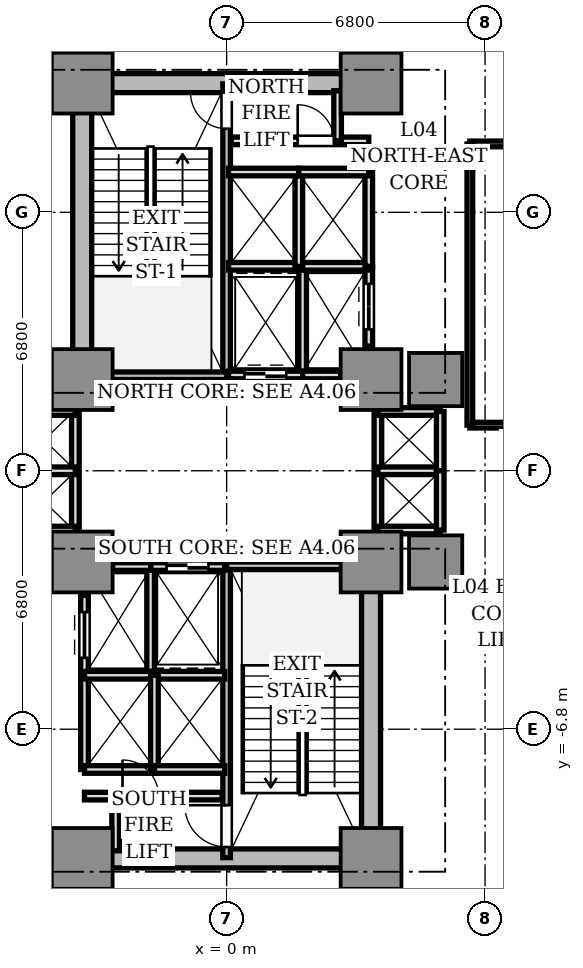
"""IFC4 building model, lengths in metres.
Left out: names, types, materials, properties, quantities, classifications, styles, units other than length and angle.
Written with IfcOpenShell. Run it as: python <this file> out.ifc"""

import sys

from ifc_helpers import new_model, si_unit, direction, frame, frame_2d, origin, origin_2d, place, context, subcontext, project, spatial, rectangle, extrude, source, transform, mapped, element, fill, save


model = new_model("IFC4")
c1 = context("Model", 3, precision=1e-05, world=origin(), true_north=direction((0.0, 1.0)))
c2 = subcontext(c1, "Body", "Model", "MODEL_VIEW")
j1 = project(units=[si_unit("LENGTHUNIT", "METRE"), si_unit("PLANEANGLEUNIT", "RADIAN")], contexts=[c1])
p1 = place(None, origin())
s1 = spatial("IfcSite", under=j1, at=p1, CompositionType="ELEMENT")
p2 = place(p1, origin())
s2 = spatial("IfcBuilding", under=s1, at=p2, CompositionType="ELEMENT")
p3 = place(p2, frame((0.0, 0.0, 18.6)))
s3 = spatial("IfcBuildingStorey", under=s2, at=p3, CompositionType="ELEMENT", Elevation=18.6)
p4 = place(p3, frame((-3.55, 10.2, 0.0), z_axis=(0.0, 0.0, 1.0), x_axis=(1.0, 0.0, 0.0)))
e1 = element("IfcWall", 1, at=p4, inside=s3, PredefinedType="SHEAR", context=c2, shape_type="SweptSolid", body=[
    extrude(rectangle(XDim=7.1, YDim=0.5, at=frame_2d((3.55, 0.0))), origin(), (0.0, 0.0, 1.0), 4.26),
])
p5 = place(p3, frame((-3.8, 2.85, 0.0), z_axis=(0.0, 0.0, 1.0), x_axis=(0.0, 1.0, 0.0)))
e2 = element("IfcWall", 2, at=p5, inside=s3, PredefinedType="SHEAR", context=c2, shape_type="SweptSolid", body=[
    extrude(rectangle(XDim=6.9, YDim=0.5, at=frame_2d((3.45, 0.0))), origin(), (0.0, 0.0, 1.0), 4.26),
])
p6 = place(p3, frame((-3.55, -10.2, 0.0), z_axis=(0.0, 0.0, 1.0), x_axis=(1.0, 0.0, 0.0)))
e3 = element("IfcWall", 3, at=p6, inside=s3, PredefinedType="SHEAR", context=c2, shape_type="SweptSolid", body=[
    extrude(rectangle(XDim=7.1, YDim=0.5, at=frame_2d((3.55, 0.0))), origin(), (0.0, 0.0, 1.0), 4.26),
])
p7 = place(p3, frame((3.8, -9.75, 0.0), z_axis=(0.0, 0.0, 1.0), x_axis=(0.0, 1.0, 0.0)))
e4 = element("IfcWall", 4, at=p7, inside=s3, PredefinedType="SHEAR", context=c2, shape_type="SweptSolid", body=[
    extrude(rectangle(XDim=6.9, YDim=0.5, at=frame_2d((3.45, 0.0))), origin(), (0.0, 0.0, 1.0), 4.26),
])
m1 = source(origin(), c2, "Body", "SweptSolid", [
    extrude(rectangle(XDim=1.6, YDim=1.6, at=origin_2d()), origin(), (0.0, 0.0, 1.0), 4.26),
])
for number, where, z_axis, x_axis in (
    (5, (-3.8, 2.4, 0.0), (0.0, 0.0, 1.0), (1.0, 0.0, 0.0)),
    (6, (3.8, 2.4, 0.0), (0.0, 0.0, 1.0), (1.0, 0.0, 0.0)),
    (7, (-3.8, 10.2, 0.0), (0.0, 0.0, 1.0), (1.0, 0.0, 0.0)),
    (8, (3.8, 10.2, 0.0), (0.0, 0.0, 1.0), (1.0, 0.0, 0.0)),
    (9, (-3.8, -2.4, 0.0), (0.0, 0.0, 1.0), (1.0, 0.0, 0.0)),
    (10, (3.8, -2.4, 0.0), (0.0, 0.0, 1.0), (1.0, 0.0, 0.0)),
    (11, (-3.8, -10.2, 0.0), (0.0, 0.0, 1.0), (1.0, 0.0, 0.0)),
    (12, (3.8, -10.2, 0.0), (0.0, 0.0, 1.0), (1.0, 0.0, 0.0)),
):
    element("IfcColumn", number, at=place(p3, frame(where, z_axis=z_axis, x_axis=x_axis)), inside=s3, PredefinedType="COLUMN", context=c2, shape_type="MappedRepresentation", body=[
        mapped(m1, transform((0.0, 0.0, 0.0), scale=1.0)),
    ])
m2 = source(origin(), c2, "Body", "SweptSolid", [
    extrude(rectangle(XDim=1.4, YDim=1.4, at=origin_2d()), origin(), (0.0, 0.0, 1.0), 4.26),
])
for number, where, z_axis, x_axis in (
    (13, (5.5, 2.4, 0.0), (0.0, 0.0, 1.0), (1.0, 0.0, 0.0)),
    (14, (5.5, -2.4, 0.0), (0.0, 0.0, 1.0), (1.0, 0.0, 0.0)),
):
    element("IfcColumn", number, at=place(p3, frame(where, z_axis=z_axis, x_axis=x_axis)), inside=s3, PredefinedType="COLUMN", context=c2, shape_type="MappedRepresentation", body=[
        mapped(m2, transform((0.0, 0.0, 0.0), scale=1.0)),
    ])
p8 = place(p3, frame((0.0, 2.5, 0.0), z_axis=(0.0, 0.0, 1.0), x_axis=(0.0, 1.0, 0.0)))
e15 = element("IfcWall", 15, at=p8, inside=s3, PredefinedType="SOLIDWALL", context=c2, shape_type="SweptSolid", body=[
    extrude(rectangle(XDim=7.68, YDim=0.2, at=frame_2d((3.84, 0.0))), origin(), (0.0, 0.0, 1.0), 4.26),
])
p9 = place(p8, frame((6.5, 0.0, 0.0)))
e16 = element("IfcOpeningElement", 16, at=p9, cuts=e15, PredefinedType="OPENING", context=c2, shape_type="SweptSolid", body=[
    extrude(rectangle(XDim=0.95, YDim=2.15, at=frame_2d((0.475, 1.075))), frame((0.0, 0.11, 0.0), z_axis=(0.0, -1.0, 0.0), x_axis=(1.0, 0.0, 0.0)), (0.0, 0.0, 1.0), 0.22),
])
p10 = place(p3, frame((-3.72, 2.5, 0.0), z_axis=(0.0, 0.0, 1.0), x_axis=(1.0, 0.0, 0.0)))
e17 = element("IfcWall", 17, at=p10, inside=s3, PredefinedType="SOLIDWALL", context=c2, shape_type="SweptSolid", body=[
    extrude(rectangle(XDim=3.72, YDim=0.2, at=frame_2d((1.86, 0.0))), origin(), (0.0, 0.0, 1.0), 4.26),
])
p11 = place(p3, frame((0.0, -10.18, 0.0), z_axis=(0.0, 0.0, 1.0), x_axis=(0.0, 1.0, 0.0)))
e18 = element("IfcWall", 18, at=p11, inside=s3, PredefinedType="SOLIDWALL", context=c2, shape_type="SweptSolid", body=[
    extrude(rectangle(XDim=7.68, YDim=0.2, at=frame_2d((3.84, 0.0))), origin(), (0.0, 0.0, 1.0), 4.26),
])
p12 = place(p11, frame((0.28, 0.0, 0.0)))
e19 = element("IfcOpeningElement", 19, at=p12, cuts=e18, PredefinedType="OPENING", context=c2, shape_type="SweptSolid", body=[
    extrude(rectangle(XDim=1.1, YDim=2.15, at=frame_2d((0.55, 1.075))), frame((0.0, 0.11, 0.0), z_axis=(0.0, -1.0, 0.0), x_axis=(1.0, 0.0, 0.0)), (0.0, 0.0, 1.0), 0.22),
])
p13 = place(p3, frame((0.0, -2.5, 0.0), z_axis=(0.0, 0.0, 1.0), x_axis=(1.0, 0.0, 0.0)))
e20 = element("IfcWall", 20, at=p13, inside=s3, PredefinedType="SOLIDWALL", context=c2, shape_type="SweptSolid", body=[
    extrude(rectangle(XDim=3.72, YDim=0.2, at=frame_2d((1.86, 0.0))), origin(), (0.0, 0.0, 1.0), 4.26),
])
p14 = place(p3, frame((2.0, 2.5, 0.0), z_axis=(0.0, 0.0, 1.0), x_axis=(0.0, 1.0, 0.0)))
e21 = element("IfcWall", 21, at=p14, inside=s3, PredefinedType="SOLIDWALL", context=c2, shape_type="SweptSolid", body=[
    extrude(rectangle(XDim=2.78, YDim=0.2, at=frame_2d((1.39, 0.0))), origin(), (0.0, 0.0, 1.0), 3.81),
])
p15 = place(p3, frame((0.05, 2.52, 0.0), z_axis=(0.0, 0.0, 1.0), x_axis=(1.0, 0.0, 0.0)))
e22 = element("IfcWall", 22, at=p15, inside=s3, PredefinedType="SOLIDWALL", context=c2, shape_type="SweptSolid", body=[
    extrude(rectangle(XDim=1.95, YDim=0.2, at=frame_2d((0.975, 0.0))), origin(), (0.0, 0.0, 1.0), 3.81),
])
p16 = place(p15, frame((0.42, 0.0, 0.0)))
e23 = element("IfcOpeningElement", 23, at=p16, cuts=e22, PredefinedType="OPENING", context=c2, shape_type="SweptSolid", body=[
    extrude(rectangle(XDim=1.1, YDim=2.2, at=frame_2d((0.55, 1.1))), frame((0.0, 0.11, 0.0), z_axis=(0.0, -1.0, 0.0), x_axis=(1.0, 0.0, 0.0)), (0.0, 0.0, 1.0), 0.22),
])
p17 = place(p3, frame((-2.0, -5.28, 0.0), z_axis=(0.0, 0.0, 1.0), x_axis=(0.0, 1.0, 0.0)))
e24 = element("IfcWall", 24, at=p17, inside=s3, PredefinedType="SOLIDWALL", context=c2, shape_type="SweptSolid", body=[
    extrude(rectangle(XDim=2.78, YDim=0.2, at=frame_2d((1.39, 0.0))), origin(), (0.0, 0.0, 1.0), 3.81),
])
p18 = place(p3, frame((-2.0, -2.52, 0.0), z_axis=(0.0, 0.0, 1.0), x_axis=(1.0, 0.0, 0.0)))
e25 = element("IfcWall", 25, at=p18, inside=s3, PredefinedType="SOLIDWALL", context=c2, shape_type="SweptSolid", body=[
    extrude(rectangle(XDim=1.95, YDim=0.2, at=frame_2d((0.975, 0.0))), origin(), (0.0, 0.0, 1.0), 3.81),
])
p19 = place(p18, frame((0.42, 0.0, 0.0)))
e26 = element("IfcOpeningElement", 26, at=p19, cuts=e25, PredefinedType="OPENING", context=c2, shape_type="SweptSolid", body=[
    extrude(rectangle(XDim=1.1, YDim=2.2, at=frame_2d((0.55, 1.1))), frame((0.0, 0.11, 0.0), z_axis=(0.0, -1.0, 0.0), x_axis=(1.0, 0.0, 0.0)), (0.0, 0.0, 1.0), 0.22),
])
p20 = place(p3, frame((2.0, 2.52, 0.0), z_axis=(0.0, 0.0, 1.0), x_axis=(1.0, 0.0, 0.0)))
e27 = element("IfcWall", 27, at=p20, inside=s3, PredefinedType="SOLIDWALL", context=c2, shape_type="SweptSolid", body=[
    extrude(rectangle(XDim=1.0, YDim=0.2, at=frame_2d((0.5, 0.0))), origin(), (0.0, 0.0, 1.0), 3.81),
])
p21 = place(p3, frame((3.74, 3.28, 0.0), z_axis=(0.0, 0.0, 1.0), x_axis=(0.0, 1.0, 0.0)))
e28 = element("IfcWall", 28, at=p21, inside=s3, PredefinedType="SOLIDWALL", context=c2, shape_type="SweptSolid", body=[
    extrude(rectangle(XDim=2.08, YDim=0.2, at=frame_2d((1.04, 0.0))), origin(), (0.0, 0.0, 1.0), 3.81),
])
p22 = place(p21, frame((0.44, 0.0, 0.0)))
e29 = element("IfcOpeningElement", 29, at=p22, cuts=e28, PredefinedType="OPENING", context=c2, shape_type="SweptSolid", body=[
    extrude(rectangle(XDim=1.2, YDim=2.2, at=frame_2d((0.6, 1.1))), frame((0.0, 0.11, 0.0), z_axis=(0.0, -1.0, 0.0), x_axis=(1.0, 0.0, 0.0)), (0.0, 0.0, 1.0), 0.22),
])
p23 = place(p3, frame((-3.0, -2.52, 0.0), z_axis=(0.0, 0.0, 1.0), x_axis=(1.0, 0.0, 0.0)))
e30 = element("IfcWall", 30, at=p23, inside=s3, PredefinedType="SOLIDWALL", context=c2, shape_type="SweptSolid", body=[
    extrude(rectangle(XDim=1.0, YDim=0.2, at=frame_2d((0.5, 0.0))), origin(), (0.0, 0.0, 1.0), 3.81),
])
p24 = place(p3, frame((-3.74, -5.36, 0.0), z_axis=(0.0, 0.0, 1.0), x_axis=(0.0, 1.0, 0.0)))
e31 = element("IfcWall", 31, at=p24, inside=s3, PredefinedType="SOLIDWALL", context=c2, shape_type="SweptSolid", body=[
    extrude(rectangle(XDim=2.08, YDim=0.2, at=frame_2d((1.04, 0.0))), origin(), (0.0, 0.0, 1.0), 3.81),
])
p25 = place(p24, frame((0.44, 0.0, 0.0)))
e32 = element("IfcOpeningElement", 32, at=p25, cuts=e31, PredefinedType="OPENING", context=c2, shape_type="SweptSolid", body=[
    extrude(rectangle(XDim=1.2, YDim=2.2, at=frame_2d((0.6, 1.1))), frame((0.0, 0.11, 0.0), z_axis=(0.0, -1.0, 0.0), x_axis=(1.0, 0.0, 0.0)), (0.0, 0.0, 1.0), 0.22),
])
p26 = place(p3, frame((0.05, 5.38, 0.0), z_axis=(0.0, 0.0, 1.0), x_axis=(1.0, 0.0, 0.0)))
e33 = element("IfcWall", 33, at=p26, inside=s3, PredefinedType="SOLIDWALL", context=c2, shape_type="SweptSolid", body=[
    extrude(rectangle(XDim=3.69, YDim=0.2, at=frame_2d((1.845, 0.0))), origin(), (0.0, 0.0, 1.0), 3.81),
])
p27 = place(p3, frame((1.9, 5.38, 0.0), z_axis=(0.0, 0.0, 1.0), x_axis=(0.0, 1.0, 0.0)))
e34 = element("IfcWall", 34, at=p27, inside=s3, PredefinedType="SOLIDWALL", context=c2, shape_type="SweptSolid", body=[
    extrude(rectangle(XDim=2.48, YDim=0.2, at=frame_2d((1.24, 0.0))), origin(), (0.0, 0.0, 1.0), 3.81),
])
p28 = place(p3, frame((0.05, 7.86, 0.0), z_axis=(0.0, 0.0, 1.0), x_axis=(1.0, 0.0, 0.0)))
e35 = element("IfcWall", 35, at=p28, inside=s3, PredefinedType="SOLIDWALL", context=c2, shape_type="SweptSolid", body=[
    extrude(rectangle(XDim=1.85, YDim=0.2, at=frame_2d((0.925, 0.0))), origin(), (0.0, 0.0, 1.0), 3.81),
])
p29 = place(p3, frame((3.74, 5.38, 0.0), z_axis=(0.0, 0.0, 1.0), x_axis=(0.0, 1.0, 0.0)))
e36 = element("IfcWall", 36, at=p29, inside=s3, PredefinedType="SOLIDWALL", context=c2, shape_type="SweptSolid", body=[
    extrude(rectangle(XDim=2.48, YDim=0.2, at=frame_2d((1.24, 0.0))), origin(), (0.0, 0.0, 1.0), 3.81),
])
p30 = place(p3, frame((1.9, 7.86, 0.0), z_axis=(0.0, 0.0, 1.0), x_axis=(1.0, 0.0, 0.0)))
e37 = element("IfcWall", 37, at=p30, inside=s3, PredefinedType="SOLIDWALL", context=c2, shape_type="SweptSolid", body=[
    extrude(rectangle(XDim=1.84, YDim=0.2, at=frame_2d((0.92, 0.0))), origin(), (0.0, 0.0, 1.0), 3.81),
])
p31 = place(p3, frame((-3.74, -7.86, 0.0), z_axis=(0.0, 0.0, 1.0), x_axis=(0.0, 1.0, 0.0)))
e38 = element("IfcWall", 38, at=p31, inside=s3, PredefinedType="SOLIDWALL", context=c2, shape_type="SweptSolid", body=[
    extrude(rectangle(XDim=2.48, YDim=0.2, at=frame_2d((1.24, 0.0))), origin(), (0.0, 0.0, 1.0), 3.81),
])
p32 = place(p3, frame((-3.74, -7.86, 0.0), z_axis=(0.0, 0.0, 1.0), x_axis=(1.0, 0.0, 0.0)))
e39 = element("IfcWall", 39, at=p32, inside=s3, PredefinedType="SOLIDWALL", context=c2, shape_type="SweptSolid", body=[
    extrude(rectangle(XDim=1.84, YDim=0.2, at=frame_2d((0.92, 0.0))), origin(), (0.0, 0.0, 1.0), 3.81),
])
p33 = place(p3, frame((-3.74, -5.38, 0.0), z_axis=(0.0, 0.0, 1.0), x_axis=(1.0, 0.0, 0.0)))
e40 = element("IfcWall", 40, at=p33, inside=s3, PredefinedType="SOLIDWALL", context=c2, shape_type="SweptSolid", body=[
    extrude(rectangle(XDim=3.69, YDim=0.2, at=frame_2d((1.845, 0.0))), origin(), (0.0, 0.0, 1.0), 3.81),
])
p34 = place(p3, frame((-1.9, -7.86, 0.0), z_axis=(0.0, 0.0, 1.0), x_axis=(0.0, 1.0, 0.0)))
e41 = element("IfcWall", 41, at=p34, inside=s3, PredefinedType="SOLIDWALL", context=c2, shape_type="SweptSolid", body=[
    extrude(rectangle(XDim=2.48, YDim=0.2, at=frame_2d((1.24, 0.0))), origin(), (0.0, 0.0, 1.0), 3.81),
])
p35 = place(p3, frame((-1.9, -7.86, 0.0), z_axis=(0.0, 0.0, 1.0), x_axis=(1.0, 0.0, 0.0)))
e42 = element("IfcWall", 42, at=p35, inside=s3, PredefinedType="SOLIDWALL", context=c2, shape_type="SweptSolid", body=[
    extrude(rectangle(XDim=1.85, YDim=0.2, at=frame_2d((0.925, 0.0))), origin(), (0.0, 0.0, 1.0), 3.81),
])
p36 = place(p3, frame((3.98, -1.56, 0.0), z_axis=(0.0, 0.0, 1.0), x_axis=(0.0, 1.0, 0.0)))
e43 = element("IfcWall", 43, at=p36, inside=s3, PredefinedType="SOLIDWALL", context=c2, shape_type="SweptSolid", body=[
    extrude(rectangle(XDim=3.12, YDim=0.2, at=frame_2d((1.56, 0.0))), origin(), (0.0, 0.0, 1.0), 3.33),
])
for number, where, z_axis, x_axis in (
    (44, (3.98, 1.56, 0.0), (0.0, 0.0, 1.0), (1.0, 0.0, 0.0)),
    (45, (3.98, -1.56, 0.0), (0.0, 0.0, 1.0), (1.0, 0.0, 0.0)),
    (46, (3.98, 0.0, 0.0), (0.0, 0.0, 1.0), (1.0, 0.0, 0.0)),
):
    element("IfcWall", number, at=place(p3, frame(where, z_axis=z_axis, x_axis=x_axis)), inside=s3, PredefinedType="SOLIDWALL", context=c2, shape_type="SweptSolid", body=[
        extrude(rectangle(XDim=1.64, YDim=0.2, at=frame_2d((0.82, 0.0))), origin(), (0.0, 0.0, 1.0), 3.81),
    ])
for number, where, z_axis, x_axis in (
    (47, (5.62, 0.0, 0.0), (0.0, 0.0, 1.0), (0.0, 1.0, 0.0)),
    (48, (5.62, -1.56, 0.0), (0.0, 0.0, 1.0), (0.0, 1.0, 0.0)),
):
    element("IfcWall", number, at=place(p3, frame(where, z_axis=z_axis, x_axis=x_axis)), inside=s3, PredefinedType="SOLIDWALL", context=c2, shape_type="SweptSolid", body=[
        extrude(rectangle(XDim=1.56, YDim=0.2, at=frame_2d((0.78, 0.0))), origin(), (0.0, 0.0, 1.0), 3.81),
    ])
p37 = place(p3, frame((-3.98, -1.56, 0.0), z_axis=(0.0, 0.0, 1.0), x_axis=(0.0, 1.0, 0.0)))
e49 = element("IfcWall", 49, at=p37, inside=s3, PredefinedType="SOLIDWALL", context=c2, shape_type="SweptSolid", body=[
    extrude(rectangle(XDim=3.12, YDim=0.2, at=frame_2d((1.56, 0.0))), origin(), (0.0, 0.0, 1.0), 3.33),
])
for number, where, z_axis, x_axis in (
    (50, (-5.62, 1.56, 0.0), (0.0, 0.0, 1.0), (1.0, 0.0, 0.0)),
    (51, (-5.62, -1.56, 0.0), (0.0, 0.0, 1.0), (1.0, 0.0, 0.0)),
    (52, (-5.62, 0.0, 0.0), (0.0, 0.0, 1.0), (1.0, 0.0, 0.0)),
):
    element("IfcWall", number, at=place(p3, frame(where, z_axis=z_axis, x_axis=x_axis)), inside=s3, PredefinedType="SOLIDWALL", context=c2, shape_type="SweptSolid", body=[
        extrude(rectangle(XDim=1.64, YDim=0.2, at=frame_2d((0.82, 0.0))), origin(), (0.0, 0.0, 1.0), 3.81),
    ])
p38 = place(p3, frame((0.12, 8.68, 0.0), z_axis=(0.0, 0.0, 1.0), x_axis=(1.0, 0.0, 0.0)))
e53 = element("IfcWall", 53, at=p38, inside=s3, PredefinedType="SOLIDWALL", context=c2, shape_type="SweptSolid", body=[
    extrude(rectangle(XDim=3.62, YDim=0.2, at=frame_2d((1.81, 0.0))), origin(), (0.0, 0.0, 1.0), 3.81),
])
p39 = place(p38, frame((1.75, 0.0, 0.0)))
e54 = element("IfcOpeningElement", 54, at=p39, cuts=e53, PredefinedType="OPENING", context=c2, shape_type="SweptSolid", body=[
    extrude(rectangle(XDim=0.95, YDim=2.15, at=frame_2d((0.475, 1.075))), frame((0.0, 0.11, 0.0), z_axis=(0.0, -1.0, 0.0), x_axis=(1.0, 0.0, 0.0)), (0.0, 0.0, 1.0), 0.22),
])
p40 = place(p3, frame((2.92, 8.68, 0.0), z_axis=(0.0, 0.0, 1.0), x_axis=(0.0, 1.0, 0.0)))
e55 = element("IfcWall", 55, at=p40, inside=s3, PredefinedType="SOLIDWALL", context=c2, shape_type="SweptSolid", body=[
    extrude(rectangle(XDim=1.32, YDim=0.2, at=frame_2d((0.66, 0.0))), origin(), (0.0, 0.0, 1.0), 3.81),
])
p41 = place(p3, frame((-3.74, -8.56, 0.0), z_axis=(0.0, 0.0, 1.0), x_axis=(1.0, 0.0, 0.0)))
e56 = element("IfcWall", 56, at=p41, inside=s3, PredefinedType="SOLIDWALL", context=c2, shape_type="SweptSolid", body=[
    extrude(rectangle(XDim=3.62, YDim=0.2, at=frame_2d((1.81, 0.0))), origin(), (0.0, 0.0, 1.0), 3.81),
])
p42 = place(p41, frame((1.0, 0.0, 0.0)))
e57 = element("IfcOpeningElement", 57, at=p42, cuts=e56, PredefinedType="OPENING", context=c2, shape_type="SweptSolid", body=[
    extrude(rectangle(XDim=0.95, YDim=2.15, at=frame_2d((0.475, 1.075))), frame((0.0, 0.11, 0.0), z_axis=(0.0, -1.0, 0.0), x_axis=(1.0, 0.0, 0.0)), (0.0, 0.0, 1.0), 0.22),
])
p43 = place(p3, frame((-2.92, -10.0, 0.0), z_axis=(0.0, 0.0, 1.0), x_axis=(0.0, 1.0, 0.0)))
e58 = element("IfcWall", 58, at=p43, inside=s3, PredefinedType="SOLIDWALL", context=c2, shape_type="SweptSolid", body=[
    extrude(rectangle(XDim=1.44, YDim=0.2, at=frame_2d((0.72, 0.0))), origin(), (0.0, 0.0, 1.0), 3.81),
])
p44 = place(p3, frame((6.4, 8.6, 0.0), z_axis=(0.0, 0.0, 1.0), x_axis=(1.0, 0.0, 0.0)))
e59 = element("IfcWall", 59, at=p44, inside=s3, PredefinedType="PARTITIONING", context=c2, shape_type="SweptSolid", body=[
    extrude(rectangle(XDim=9.7, YDim=0.15, at=frame_2d((4.85, 0.0))), origin(), (0.0, 0.0, 1.0), 3.81),
])
p45 = place(p3, frame((6.4, 1.2, 0.0), z_axis=(0.0, 0.0, 1.0), x_axis=(1.0, 0.0, 0.0)))
e60 = element("IfcWall", 60, at=p45, inside=s3, PredefinedType="PARTITIONING", context=c2, shape_type="SweptSolid", body=[
    extrude(rectangle(XDim=9.7, YDim=0.15, at=frame_2d((4.85, 0.0))), origin(), (0.0, 0.0, 1.0), 3.81),
])
p46 = place(p45, frame((1.35, 0.0, 0.0)))
e61 = element("IfcOpeningElement", 61, at=p46, cuts=e60, PredefinedType="OPENING", context=c2, shape_type="SweptSolid", body=[
    extrude(rectangle(XDim=0.95, YDim=2.15, at=frame_2d((0.475, 1.075))), frame((0.0, 0.085, 0.0), z_axis=(0.0, -1.0, 0.0), x_axis=(1.0, 0.0, 0.0)), (0.0, 0.0, 1.0), 0.17),
])
p47 = place(p3, frame((6.4, 1.2, 0.0), z_axis=(0.0, 0.0, 1.0), x_axis=(0.0, 1.0, 0.0)))
e62 = element("IfcWall", 62, at=p47, inside=s3, PredefinedType="PARTITIONING", context=c2, shape_type="SweptSolid", body=[
    extrude(rectangle(XDim=7.4, YDim=0.15, at=frame_2d((3.7, 0.0))), origin(), (0.0, 0.0, 1.0), 3.81),
])
m3 = source(origin(), c2, "Body", "SweptSolid", [
    extrude(rectangle(XDim=1.1, YDim=0.05, at=origin_2d()), origin(), (0.0, 0.0, 1.0), 2.2),
])
p48 = place(p16, frame((0.55, 0.0, 0.0)))
e63 = element("IfcDoor", 63, at=p48, inside=s3, OperationType="DOUBLE_DOOR_SLIDING", PredefinedType="DOOR", context=c2, shape_type="MappedRepresentation", body=[
    mapped(m3, transform((0.0, 0.0, 0.0), scale=1.0)),
])
fill(e23, e63)
p49 = place(p19, frame((0.55, 0.0, 0.0)))
e64 = element("IfcDoor", 64, at=p49, inside=s3, OperationType="DOUBLE_DOOR_SLIDING", PredefinedType="DOOR", context=c2, shape_type="MappedRepresentation", body=[
    mapped(m3, transform((0.0, 0.0, 0.0), scale=1.0)),
])
fill(e26, e64)
m4 = source(origin(), c2, "Body", "SweptSolid", [
    extrude(rectangle(XDim=1.2, YDim=0.05, at=origin_2d()), origin(), (0.0, 0.0, 1.0), 2.2),
])
p50 = place(p22, frame((0.6, 0.0, 0.0)))
e65 = element("IfcDoor", 65, at=p50, inside=s3, OperationType="DOUBLE_DOOR_SLIDING", PredefinedType="DOOR", context=c2, shape_type="MappedRepresentation", body=[
    mapped(m4, transform((0.0, 0.0, 0.0), scale=1.0)),
])
fill(e29, e65)
p51 = place(p25, frame((0.6, 0.0, 0.0)))
e66 = element("IfcDoor", 66, at=p51, inside=s3, OperationType="DOUBLE_DOOR_SLIDING", PredefinedType="DOOR", context=c2, shape_type="MappedRepresentation", body=[
    mapped(m4, transform((0.0, 0.0, 0.0), scale=1.0)),
])
fill(e32, e66)
m5 = source(origin(), c2, "Body", "SweptSolid", [
    extrude(rectangle(XDim=0.95, YDim=0.05, at=origin_2d()), origin(), (0.0, 0.0, 1.0), 2.15),
])
p52 = place(p9, frame((0.475, 0.0, 0.0)))
e67 = element("IfcDoor", 67, at=p52, inside=s3, OperationType="SINGLE_SWING_RIGHT", PredefinedType="DOOR", context=c2, shape_type="MappedRepresentation", body=[
    mapped(m5, transform((0.0, 0.0, 0.0), scale=1.0)),
])
fill(e16, e67)
p53 = place(p39, frame((0.475, 0.0, 0.0)))
e68 = element("IfcDoor", 68, at=p53, inside=s3, OperationType="SINGLE_SWING_LEFT", PredefinedType="DOOR", context=c2, shape_type="MappedRepresentation", body=[
    mapped(m5, transform((0.0, 0.0, 0.0), scale=1.0)),
])
fill(e54, e68)
m6 = source(origin(), c2, "Body", "SweptSolid", [
    extrude(rectangle(XDim=1.1, YDim=0.05, at=origin_2d()), origin(), (0.0, 0.0, 1.0), 2.15),
])
p54 = place(p12, frame((0.55, 0.0, 0.0)))
e69 = element("IfcDoor", 69, at=p54, inside=s3, OperationType="SINGLE_SWING_RIGHT", PredefinedType="DOOR", context=c2, shape_type="MappedRepresentation", body=[
    mapped(m6, transform((0.0, 0.0, 0.0), scale=1.0)),
])
fill(e19, e69)
p55 = place(p42, frame((0.475, 0.0, 0.0)))
e70 = element("IfcDoor", 70, at=p55, inside=s3, OperationType="SINGLE_SWING_LEFT", PredefinedType="DOOR", context=c2, shape_type="MappedRepresentation", body=[
    mapped(m5, transform((0.0, 0.0, 0.0), scale=1.0)),
])
fill(e57, e70)
save(model, sys.argv[1])
